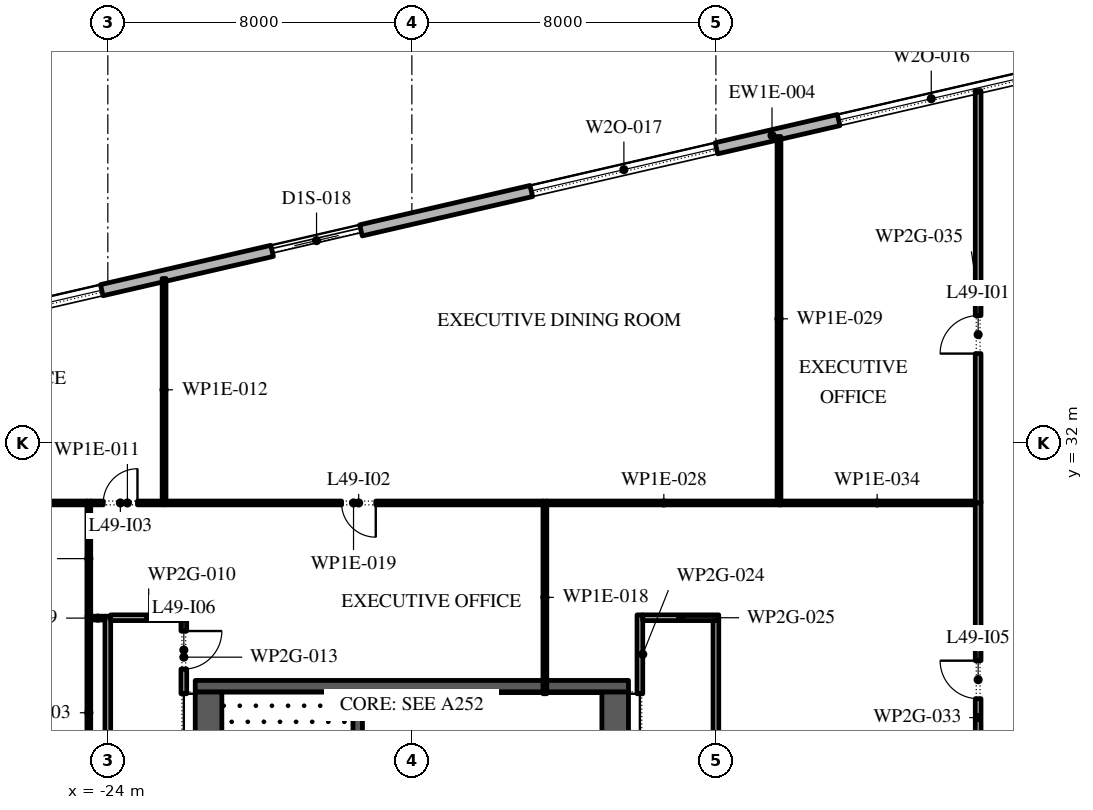
"""IFC4 building model, lengths in metres.
Left out: names, types, materials, properties, quantities, classifications, styles, units other than length and angle.
Written with IfcOpenShell. Run it as: python <this file> out.ifc"""

import sys

from ifc_helpers import new_model, si_unit, direction, frame, frame_2d, origin, place, context, subcontext, project, spatial, rectangle, extrude, element, fill, save


model = new_model("IFC4")
c1 = context("Model", 3, precision=1e-05, world=origin(), true_north=direction((0.0, 1.0)))
c2 = subcontext(c1, "Body", "Model", "MODEL_VIEW")
j1 = project(units=[si_unit("LENGTHUNIT", "METRE"), si_unit("PLANEANGLEUNIT", "RADIAN")], contexts=[c1])
p1 = place(None, origin())
s1 = spatial("IfcSite", under=j1, at=p1, CompositionType="ELEMENT")
p2 = place(p1, origin())
s2 = spatial("IfcBuilding", under=s1, at=p2, CompositionType="ELEMENT")
p3 = place(p2, frame((0.0, 0.0, 222.0)))
s3 = spatial("IfcBuildingStorey", under=s2, at=p3, CompositionType="ELEMENT", Elevation=222.0)
p4 = place(p3, frame((17.592, 45.657, 0.0), z_axis=(0.0, 0.0, 1.0), x_axis=(-0.974370243697, -0.224950279389, 0.0)))
e1 = element("IfcWall", 1, at=p4, inside=s3, PredefinedType="STANDARD", context=c2, shape_type="SweptSolid", body=[
    extrude(rectangle(XDim=49.5, YDim=0.3, at=frame_2d((24.75, 0.0))), origin(), (0.0, 0.0, 1.0), 3.75),
])
p5 = place(p4, frame((3.6, 0.0, 0.0)))
e2 = element("IfcOpeningElement", 2, at=p5, cuts=e1, PredefinedType="OPENING", context=c2, shape_type="SweptSolid", body=[
    extrude(rectangle(XDim=2.4, YDim=3.5, at=frame_2d((1.2, 1.75))), frame((0.0, 0.16, 0.0), z_axis=(0.0, -1.0, 0.0), x_axis=(1.0, 0.0, 0.0)), (0.0, 0.0, 1.0), 0.32),
])
p6 = place(p4, frame((9.65, 0.0, 0.45)))
e3 = element("IfcOpeningElement", 3, at=p6, cuts=e1, PredefinedType="OPENING", context=c2, shape_type="SweptSolid", body=[
    extrude(rectangle(XDim=5.0, YDim=2.2, at=frame_2d((2.5, 1.1))), frame((0.0, 0.16, 0.0), z_axis=(0.0, -1.0, 0.0), x_axis=(1.0, 0.0, 0.0)), (0.0, 0.0, 1.0), 0.32),
])
p7 = place(p4, frame((17.95, 0.0, 0.45)))
e4 = element("IfcOpeningElement", 4, at=p7, cuts=e1, PredefinedType="OPENING", context=c2, shape_type="SweptSolid", body=[
    extrude(rectangle(XDim=5.0, YDim=2.2, at=frame_2d((2.5, 1.1))), frame((0.0, 0.16, 0.0), z_axis=(0.0, -1.0, 0.0), x_axis=(1.0, 0.0, 0.0)), (0.0, 0.0, 1.0), 0.32),
])
p8 = place(p4, frame((26.25, 0.0, 0.45)))
e5 = element("IfcOpeningElement", 5, at=p8, cuts=e1, PredefinedType="OPENING", context=c2, shape_type="SweptSolid", body=[
    extrude(rectangle(XDim=5.0, YDim=2.2, at=frame_2d((2.5, 1.1))), frame((0.0, 0.16, 0.0), z_axis=(0.0, -1.0, 0.0), x_axis=(1.0, 0.0, 0.0)), (0.0, 0.0, 1.0), 0.32),
])
p9 = place(p4, frame((35.85, 0.0, 0.0)))
e6 = element("IfcOpeningElement", 6, at=p9, cuts=e1, PredefinedType="OPENING", context=c2, shape_type="SweptSolid", body=[
    extrude(rectangle(XDim=2.4, YDim=2.7, at=frame_2d((1.2, 1.35))), frame((0.0, 0.16, 0.0), z_axis=(0.0, -1.0, 0.0), x_axis=(1.0, 0.0, 0.0)), (0.0, 0.0, 1.0), 0.32),
])
p10 = place(p4, frame((42.85, 0.0, 0.45)))
e7 = element("IfcOpeningElement", 7, at=p10, cuts=e1, PredefinedType="OPENING", context=c2, shape_type="SweptSolid", body=[
    extrude(rectangle(XDim=5.0, YDim=2.275, at=frame_2d((2.5, 1.137))), frame((0.0, 0.16, 0.0), z_axis=(0.0, -1.0, 0.0), x_axis=(1.0, 0.0, 0.0)), (0.0, 0.0, 1.0), 0.32),
])
p11 = place(p3, frame((-33.157, 30.092, 0.0), z_axis=(0.0, 0.0, 1.0), x_axis=(0.224950279389, -0.974370243697, 0.0)))
e8 = element("IfcWall", 8, at=p11, inside=s3, PredefinedType="STANDARD", context=c2, shape_type="SweptSolid", body=[
    extrude(rectangle(XDim=49.5, YDim=0.3, at=frame_2d((24.75, 0.0))), origin(), (0.0, 0.0, 1.0), 3.75),
])
p12 = place(p11, frame((2.207, 0.0, 0.0)))
e9 = element("IfcOpeningElement", 9, at=p12, cuts=e8, PredefinedType="OPENING", context=c2, shape_type="SweptSolid", body=[
    extrude(rectangle(XDim=2.4, YDim=3.5, at=frame_2d((1.2, 1.75))), frame((0.0, 0.16, 0.0), z_axis=(0.0, -1.0, 0.0), x_axis=(1.0, 0.0, 0.0)), (0.0, 0.0, 1.0), 0.32),
])
p13 = place(p11, frame((7.871, 0.0, 0.45)))
e10 = element("IfcOpeningElement", 10, at=p13, cuts=e8, PredefinedType="OPENING", context=c2, shape_type="SweptSolid", body=[
    extrude(rectangle(XDim=5.0, YDim=2.575, at=frame_2d((2.5, 1.288))), frame((0.0, 0.16, 0.0), z_axis=(0.0, -1.0, 0.0), x_axis=(1.0, 0.0, 0.0)), (0.0, 0.0, 1.0), 0.32),
])
p14 = place(p11, frame((14.986, 0.0, 0.45)))
e11 = element("IfcOpeningElement", 11, at=p14, cuts=e8, PredefinedType="OPENING", context=c2, shape_type="SweptSolid", body=[
    extrude(rectangle(XDim=5.0, YDim=3.25, at=frame_2d((2.5, 1.625))), frame((0.0, 0.16, 0.0), z_axis=(0.0, -1.0, 0.0), x_axis=(1.0, 0.0, 0.0)), (0.0, 0.0, 1.0), 0.32),
])
p15 = place(p11, frame((22.1, 0.0, 0.45)))
e12 = element("IfcOpeningElement", 12, at=p15, cuts=e8, PredefinedType="OPENING", context=c2, shape_type="SweptSolid", body=[
    extrude(rectangle(XDim=5.0, YDim=2.75, at=frame_2d((2.5, 1.375))), frame((0.0, 0.16, 0.0), z_axis=(0.0, -1.0, 0.0), x_axis=(1.0, 0.0, 0.0)), (0.0, 0.0, 1.0), 0.32),
])
p16 = place(p11, frame((30.514, 0.0, 0.0)))
e13 = element("IfcOpeningElement", 13, at=p16, cuts=e8, PredefinedType="OPENING", context=c2, shape_type="SweptSolid", body=[
    extrude(rectangle(XDim=2.4, YDim=3.5, at=frame_2d((1.2, 1.75))), frame((0.0, 0.16, 0.0), z_axis=(0.0, -1.0, 0.0), x_axis=(1.0, 0.0, 0.0)), (0.0, 0.0, 1.0), 0.32),
])
p17 = place(p11, frame((36.329, 0.0, 0.45)))
e14 = element("IfcOpeningElement", 14, at=p17, cuts=e8, PredefinedType="OPENING", context=c2, shape_type="SweptSolid", body=[
    extrude(rectangle(XDim=5.0, YDim=3.25, at=frame_2d((2.5, 1.625))), frame((0.0, 0.16, 0.0), z_axis=(0.0, -1.0, 0.0), x_axis=(1.0, 0.0, 0.0)), (0.0, 0.0, 1.0), 0.32),
])
p18 = place(p11, frame((43.443, 0.0, 0.45)))
e15 = element("IfcOpeningElement", 15, at=p18, cuts=e8, PredefinedType="OPENING", context=c2, shape_type="SweptSolid", body=[
    extrude(rectangle(XDim=5.0, YDim=3.25, at=frame_2d((2.5, 1.625))), frame((0.0, 0.16, 0.0), z_axis=(0.0, -1.0, 0.0), x_axis=(1.0, 0.0, 0.0)), (0.0, 0.0, 1.0), 0.32),
])
p19 = place(p3, frame((-21.35, -2.45, 0.0), z_axis=(0.0, 0.0, 1.0), x_axis=(0.0, 1.0, 0.0)))
e16 = element("IfcWall", 16, at=p19, inside=s3, PredefinedType="SHEAR", context=c2, shape_type="SweptSolid", body=[
    extrude(rectangle(XDim=27.9, YDim=0.7, at=frame_2d((13.95, 0.0))), origin(), (0.0, 0.0, 1.0), 3.75),
])
p20 = place(p19, frame((5.05, 0.0, 0.0)))
e17 = element("IfcOpeningElement", 17, at=p20, cuts=e16, PredefinedType="OPENING", context=c2, shape_type="SweptSolid", body=[
    extrude(rectangle(XDim=1.2, YDim=2.1, at=frame_2d((0.6, 1.05))), frame((0.0, 0.36, 0.0), z_axis=(0.0, -1.0, 0.0), x_axis=(1.0, 0.0, 0.0)), (0.0, 0.0, 1.0), 0.72),
])
p21 = place(p19, frame((21.65, 0.0, 0.0)))
e18 = element("IfcOpeningElement", 18, at=p21, cuts=e16, PredefinedType="OPENING", context=c2, shape_type="SweptSolid", body=[
    extrude(rectangle(XDim=1.2, YDim=2.1, at=frame_2d((0.6, 1.05))), frame((0.0, 0.36, 0.0), z_axis=(0.0, -1.0, 0.0), x_axis=(1.0, 0.0, 0.0)), (0.0, 0.0, 1.0), 0.72),
])
p22 = place(p3, frame((-10.65, -2.45, 0.0), z_axis=(0.0, 0.0, 1.0), x_axis=(0.0, 1.0, 0.0)))
e19 = element("IfcWall", 19, at=p22, inside=s3, PredefinedType="SHEAR", context=c2, shape_type="SweptSolid", body=[
    extrude(rectangle(XDim=27.9, YDim=0.7, at=frame_2d((13.95, 0.0))), origin(), (0.0, 0.0, 1.0), 3.75),
])
p23 = place(p22, frame((23.65, 0.0, 0.0)))
e20 = element("IfcOpeningElement", 20, at=p23, cuts=e19, PredefinedType="OPENING", context=c2, shape_type="SweptSolid", body=[
    extrude(rectangle(XDim=2.4, YDim=2.1, at=frame_2d((1.2, 1.05))), frame((0.0, 0.36, 0.0), z_axis=(0.0, -1.0, 0.0), x_axis=(1.0, 0.0, 0.0)), (0.0, 0.0, 1.0), 0.72),
])
p24 = place(p22, frame((1.387, 0.0, 0.0)))
e21 = element("IfcOpeningElement", 21, at=p24, cuts=e19, PredefinedType="OPENING", context=c2, shape_type="SweptSolid", body=[
    extrude(rectangle(XDim=0.9, YDim=2.1, at=frame_2d((0.45, 1.05))), frame((0.0, 0.36, 0.0), z_axis=(0.0, -1.0, 0.0), x_axis=(1.0, 0.0, 0.0)), (0.0, 0.0, 1.0), 0.72),
])
p25 = place(p22, frame((4.562, 0.0, 0.0)))
e22 = element("IfcOpeningElement", 22, at=p25, cuts=e19, PredefinedType="OPENING", context=c2, shape_type="SweptSolid", body=[
    extrude(rectangle(XDim=1.0, YDim=2.1, at=frame_2d((0.5, 1.05))), frame((0.0, 0.36, 0.0), z_axis=(0.0, -1.0, 0.0), x_axis=(1.0, 0.0, 0.0)), (0.0, 0.0, 1.0), 0.72),
])
p26 = place(p3, frame((-21.7, 25.6, 0.0), z_axis=(0.0, 0.0, 1.0), x_axis=(1.0, 0.0, 0.0)))
e23 = element("IfcWall", 23, at=p26, inside=s3, PredefinedType="SHEAR", context=c2, shape_type="SweptSolid", body=[
    extrude(rectangle(XDim=11.4, YDim=0.3, at=frame_2d((5.7, 0.0))), origin(), (0.0, 0.0, 1.0), 3.75),
])
p27 = place(p3, frame((-17.425, 19.15, 0.0), z_axis=(0.0, 0.0, 1.0), x_axis=(0.0, 1.0, 0.0)))
e24 = element("IfcWall", 24, at=p27, inside=s3, PredefinedType="SHEAR", context=c2, shape_type="SweptSolid", body=[
    extrude(rectangle(XDim=6.3, YDim=0.25, at=frame_2d((3.15, 0.0))), origin(), (0.0, 0.0, 1.0), 3.75),
])
p28 = place(p27, frame((0.05, 0.0, 0.0)))
e25 = element("IfcOpeningElement", 25, at=p28, cuts=e24, PredefinedType="OPENING", context=c2, shape_type="SweptSolid", body=[
    extrude(rectangle(XDim=1.2, YDim=2.1, at=frame_2d((0.6, 1.05))), frame((0.0, 0.135, 0.0), z_axis=(0.0, -1.0, 0.0), x_axis=(1.0, 0.0, 0.0)), (0.0, 0.0, 1.0), 0.27),
])
p29 = place(p3, frame((-24.5, 22.36, 0.0), z_axis=(0.0, 0.0, 1.0), x_axis=(0.0, 1.0, 0.0)))
e26 = element("IfcWall", 26, at=p29, inside=s3, PredefinedType="PARTITIONING", context=c2, shape_type="SweptSolid", body=[
    extrude(rectangle(XDim=5.08, YDim=0.1, at=frame_2d((2.54, 0.0))), origin(), (0.0, 0.0, 1.0), 3.75),
])
p30 = place(p3, frame((-24.5, 27.44, 0.0), z_axis=(0.0, 0.0, 1.0), x_axis=(0.0, 1.0, 0.0)))
e27 = element("IfcWall", 27, at=p30, inside=s3, PredefinedType="PARTITIONING", context=c2, shape_type="SweptSolid", body=[
    extrude(rectangle(XDim=3.03, YDim=0.1, at=frame_2d((1.515, 0.0))), origin(), (0.0, 0.0, 1.0), 3.75),
])
p31 = place(p3, frame((-24.55, 30.42, 0.0), z_axis=(0.0, 0.0, 1.0), x_axis=(-1.0, 0.0, 0.0)))
e28 = element("IfcWall", 28, at=p31, inside=s3, PredefinedType="PARTITIONING", context=c2, shape_type="SweptSolid", body=[
    extrude(rectangle(XDim=7.432, YDim=0.1, at=frame_2d((3.716, 0.0))), origin(), (0.0, 0.0, 1.0), 3.75),
])
p32 = place(p3, frame((-24.0, 9.67, 0.0), z_axis=(0.0, 0.0, 1.0), x_axis=(0.0, 1.0, 0.0)))
e29 = element("IfcWall", 29, at=p32, inside=s3, PredefinedType="PARTITIONING", context=c2, shape_type="SweptSolid", body=[
    extrude(rectangle(XDim=17.77, YDim=0.15, at=frame_2d((8.885, 0.0))), origin(), (0.0, 0.0, 1.0), 3.75),
])
p33 = place(p32, frame((6.57, 0.0, 0.0)))
e30 = element("IfcOpeningElement", 30, at=p33, cuts=e29, PredefinedType="OPENING", context=c2, shape_type="SweptSolid", body=[
    extrude(rectangle(XDim=1.0, YDim=2.1, at=frame_2d((0.5, 1.05))), frame((0.0, 0.085, 0.0), z_axis=(0.0, -1.0, 0.0), x_axis=(1.0, 0.0, 0.0)), (0.0, 0.0, 1.0), 0.17),
])
p34 = place(p3, frame((-24.075, 27.39, 0.0), z_axis=(0.0, 0.0, 1.0), x_axis=(-1.0, 0.0, 0.0)))
e31 = element("IfcWall", 31, at=p34, inside=s3, PredefinedType="PARTITIONING", context=c2, shape_type="SweptSolid", body=[
    extrude(rectangle(XDim=0.375, YDim=0.1, at=frame_2d((0.188, 0.0))), origin(), (0.0, 0.0, 1.0), 3.75),
])
p35 = place(p3, frame((-23.925, 27.4, 0.0), z_axis=(0.0, 0.0, 1.0), x_axis=(1.0, 0.0, 0.0)))
e32 = element("IfcWall", 32, at=p35, inside=s3, PredefinedType="PARTITIONING", context=c2, shape_type="SweptSolid", body=[
    extrude(rectangle(XDim=2.0, YDim=0.15, at=frame_2d((1.0, 0.0))), origin(), (0.0, 0.0, 1.0), 3.75),
])
p36 = place(p3, frame((-22.52, 30.42, 0.0), z_axis=(0.0, 0.0, 1.0), x_axis=(-1.0, 0.0, 0.0)))
e33 = element("IfcWall", 33, at=p36, inside=s3, PredefinedType="PARTITIONING", context=c2, shape_type="SweptSolid", body=[
    extrude(rectangle(XDim=1.93, YDim=0.1, at=frame_2d((0.965, 0.0))), origin(), (0.0, 0.0, 1.0), 3.75),
])
p37 = place(p36, frame((0.7, 0.0, 0.0)))
e34 = element("IfcOpeningElement", 34, at=p37, cuts=e33, PredefinedType="OPENING", context=c2, shape_type="SweptSolid", body=[
    extrude(rectangle(XDim=0.9, YDim=2.1, at=frame_2d((0.45, 1.05))), frame((0.0, 0.06, 0.0), z_axis=(0.0, -1.0, 0.0), x_axis=(1.0, 0.0, 0.0)), (0.0, 0.0, 1.0), 0.12),
])
p38 = place(p3, frame((-22.52, 30.47, 0.0), z_axis=(0.0, 0.0, 1.0), x_axis=(0.0, 1.0, 0.0)))
e35 = element("IfcWall", 35, at=p38, inside=s3, PredefinedType="PARTITIONING", context=c2, shape_type="SweptSolid", body=[
    extrude(rectangle(XDim=5.855, YDim=0.1, at=frame_2d((2.927, 0.0))), origin(), (0.0, 0.0, 1.0), 3.75),
])
p39 = place(p3, frame((-22.0, 27.325, 0.0), z_axis=(0.0, 0.0, 1.0), x_axis=(0.0, -1.0, 0.0)))
e36 = element("IfcWall", 36, at=p39, inside=s3, PredefinedType="PARTITIONING", context=c2, shape_type="SweptSolid", body=[
    extrude(rectangle(XDim=1.925, YDim=0.15, at=frame_2d((0.962, 0.0))), origin(), (0.0, 0.0, 1.0), 3.75),
])
p40 = place(p39, frame((0.275, 0.0, 0.0)))
e37 = element("IfcOpeningElement", 37, at=p40, cuts=e36, PredefinedType="OPENING", context=c2, shape_type="SweptSolid", body=[
    extrude(rectangle(XDim=1.0, YDim=2.1, at=frame_2d((0.5, 1.05))), frame((0.0, 0.085, 0.0), z_axis=(0.0, -1.0, 0.0), x_axis=(1.0, 0.0, 0.0)), (0.0, 0.0, 1.0), 0.17),
])
p41 = place(p3, frame((-12.5, 25.4, 0.0), z_axis=(0.0, 0.0, 1.0), x_axis=(0.0, 1.0, 0.0)))
e38 = element("IfcWall", 38, at=p41, inside=s3, PredefinedType="PARTITIONING", context=c2, shape_type="SweptSolid", body=[
    extrude(rectangle(XDim=5.07, YDim=0.1, at=frame_2d((2.535, 0.0))), origin(), (0.0, 0.0, 1.0), 3.75),
])
p42 = place(p3, frame((-12.55, 30.42, 0.0), z_axis=(0.0, 0.0, 1.0), x_axis=(-1.0, 0.0, 0.0)))
e39 = element("IfcWall", 39, at=p42, inside=s3, PredefinedType="PARTITIONING", context=c2, shape_type="SweptSolid", body=[
    extrude(rectangle(XDim=9.97, YDim=0.1, at=frame_2d((4.985, 0.0))), origin(), (0.0, 0.0, 1.0), 3.75),
])
p43 = place(p42, frame((4.4, 0.0, 0.0)))
e40 = element("IfcOpeningElement", 40, at=p43, cuts=e39, PredefinedType="OPENING", context=c2, shape_type="SweptSolid", body=[
    extrude(rectangle(XDim=0.9, YDim=2.1, at=frame_2d((0.45, 1.05))), frame((0.0, 0.06, 0.0), z_axis=(0.0, -1.0, 0.0), x_axis=(1.0, 0.0, 0.0)), (0.0, 0.0, 1.0), 0.12),
])
p44 = place(p3, frame((-10.0, 25.4, 0.0), z_axis=(0.0, 0.0, 1.0), x_axis=(0.0, 1.0, 0.0)))
e41 = element("IfcWall", 41, at=p44, inside=s3, PredefinedType="PARTITIONING", context=c2, shape_type="SweptSolid", body=[
    extrude(rectangle(XDim=2.075, YDim=0.15, at=frame_2d((1.038, 0.0))), origin(), (0.0, 0.0, 1.0), 3.75),
])
p45 = place(p3, frame((-9.925, 27.4, 0.0), z_axis=(0.0, 0.0, 1.0), x_axis=(1.0, 0.0, 0.0)))
e42 = element("IfcWall", 42, at=p45, inside=s3, PredefinedType="PARTITIONING", context=c2, shape_type="SweptSolid", body=[
    extrude(rectangle(XDim=2.0, YDim=0.15, at=frame_2d((1.0, 0.0))), origin(), (0.0, 0.0, 1.0), 3.75),
])
p46 = place(p3, frame((-8.0, 27.325, 0.0), z_axis=(0.0, 0.0, 1.0), x_axis=(0.0, -1.0, 0.0)))
e43 = element("IfcWall", 43, at=p46, inside=s3, PredefinedType="PARTITIONING", context=c2, shape_type="SweptSolid", body=[
    extrude(rectangle(XDim=8.25, YDim=0.15, at=frame_2d((4.125, 0.0))), origin(), (0.0, 0.0, 1.0), 3.75),
])
p47 = place(p3, frame((-6.29, 30.42, 0.0), z_axis=(0.0, 0.0, 1.0), x_axis=(-1.0, 0.0, 0.0)))
e44 = element("IfcWall", 44, at=p47, inside=s3, PredefinedType="PARTITIONING", context=c2, shape_type="SweptSolid", body=[
    extrude(rectangle(XDim=6.16, YDim=0.1, at=frame_2d((3.08, 0.0))), origin(), (0.0, 0.0, 1.0), 3.75),
])
p48 = place(p3, frame((-6.34, 30.47, 0.0), z_axis=(0.0, 0.0, 1.0), x_axis=(0.0, 1.0, 0.0)))
e45 = element("IfcWall", 45, at=p48, inside=s3, PredefinedType="PARTITIONING", context=c2, shape_type="SweptSolid", body=[
    extrude(rectangle(XDim=9.591, YDim=0.1, at=frame_2d((4.795, 0.0))), origin(), (0.0, 0.0, 1.0), 3.75),
])
p49 = place(p3, frame((-1.1, 19.075, 0.0), z_axis=(0.0, 0.0, 1.0), x_axis=(0.0, 1.0, 0.0)))
e46 = element("IfcWall", 46, at=p49, inside=s3, PredefinedType="PARTITIONING", context=c2, shape_type="SweptSolid", body=[
    extrude(rectangle(XDim=11.395, YDim=0.15, at=frame_2d((5.698, 0.0))), origin(), (0.0, 0.0, 1.0), 3.75),
])
p50 = place(p49, frame((6.195, 0.0, 0.0)))
e47 = element("IfcOpeningElement", 47, at=p50, cuts=e46, PredefinedType="OPENING", context=c2, shape_type="SweptSolid", body=[
    extrude(rectangle(XDim=1.0, YDim=2.1, at=frame_2d((0.5, 1.05))), frame((0.0, 0.085, 0.0), z_axis=(0.0, -1.0, 0.0), x_axis=(1.0, 0.0, 0.0)), (0.0, 0.0, 1.0), 0.17),
])
p51 = place(p3, frame((-1.175, 30.42, 0.0), z_axis=(0.0, 0.0, 1.0), x_axis=(-1.0, 0.0, 0.0)))
e48 = element("IfcWall", 48, at=p51, inside=s3, PredefinedType="PARTITIONING", context=c2, shape_type="SweptSolid", body=[
    extrude(rectangle(XDim=5.165, YDim=0.1, at=frame_2d((2.583, 0.0))), origin(), (0.0, 0.0, 1.0), 3.75),
])
p52 = place(p3, frame((-1.1, 30.42, 0.0), z_axis=(0.0, 0.0, 1.0), x_axis=(0.0, 1.0, 0.0)))
e49 = element("IfcWall", 49, at=p52, inside=s3, PredefinedType="PARTITIONING", context=c2, shape_type="SweptSolid", body=[
    extrude(rectangle(XDim=10.85, YDim=0.15, at=frame_2d((5.425, 0.0))), origin(), (0.0, 0.0, 1.0), 3.75),
])
p53 = place(p52, frame((3.93, 0.0, 0.0)))
e50 = element("IfcOpeningElement", 50, at=p53, cuts=e49, PredefinedType="OPENING", context=c2, shape_type="SweptSolid", body=[
    extrude(rectangle(XDim=1.0, YDim=2.1, at=frame_2d((0.5, 1.05))), frame((0.0, 0.085, 0.0), z_axis=(0.0, -1.0, 0.0), x_axis=(1.0, 0.0, 0.0)), (0.0, 0.0, 1.0), 0.17),
])
p54 = place(p7, origin())
e51 = element("IfcWindow", 51, at=p54, inside=s3, PartitioningType="DOUBLE_PANEL_VERTICAL", PredefinedType="WINDOW", context=c2, shape_type="SweptSolid", body=[
    extrude(rectangle(XDim=5.0, YDim=2.2, at=frame_2d((2.5, 1.1))), frame((0.0, 0.03, 0.0), z_axis=(0.0, -1.0, 0.0), x_axis=(1.0, 0.0, 0.0)), (0.0, 0.0, 1.0), 0.06),
])
fill(e4, e51)
p55 = place(p8, origin())
e52 = element("IfcWindow", 52, at=p55, inside=s3, PartitioningType="DOUBLE_PANEL_VERTICAL", PredefinedType="WINDOW", context=c2, shape_type="SweptSolid", body=[
    extrude(rectangle(XDim=5.0, YDim=2.2, at=frame_2d((2.5, 1.1))), frame((0.0, 0.03, 0.0), z_axis=(0.0, -1.0, 0.0), x_axis=(1.0, 0.0, 0.0)), (0.0, 0.0, 1.0), 0.06),
])
fill(e5, e52)
p56 = place(p9, origin())
e53 = element("IfcDoor", 53, at=p56, inside=s3, OperationType="DOUBLE_DOOR_SLIDING", PredefinedType="DOOR", context=c2, shape_type="SweptSolid", body=[
    extrude(rectangle(XDim=2.4, YDim=2.7, at=frame_2d((1.2, 1.35))), frame((0.0, 0.025, 0.0), z_axis=(0.0, -1.0, 0.0), x_axis=(1.0, 0.0, 0.0)), (0.0, 0.0, 1.0), 0.05),
])
fill(e6, e53)
p57 = place(p10, origin())
e54 = element("IfcWindow", 54, at=p57, inside=s3, PartitioningType="DOUBLE_PANEL_VERTICAL", PredefinedType="WINDOW", context=c2, shape_type="SweptSolid", body=[
    extrude(rectangle(XDim=5.0, YDim=2.275, at=frame_2d((2.5, 1.137))), frame((0.0, 0.03, 0.0), z_axis=(0.0, -1.0, 0.0), x_axis=(1.0, 0.0, 0.0)), (0.0, 0.0, 1.0), 0.06),
])
fill(e7, e54)
p58 = place(p53, origin())
e55 = element("IfcDoor", 55, at=p58, inside=s3, OperationType="SINGLE_SWING_RIGHT", PredefinedType="DOOR", context=c2, shape_type="SweptSolid", body=[
    extrude(rectangle(XDim=1.0, YDim=2.1, at=frame_2d((0.5, 1.05))), frame((0.0, 0.025, 0.0), z_axis=(0.0, -1.0, 0.0), x_axis=(1.0, 0.0, 0.0)), (0.0, 0.0, 1.0), 0.05),
])
fill(e50, e55)
p59 = place(p43, origin())
e56 = element("IfcDoor", 56, at=p59, inside=s3, OperationType="SINGLE_SWING_RIGHT", PredefinedType="DOOR", context=c2, shape_type="SweptSolid", body=[
    extrude(rectangle(XDim=0.9, YDim=2.1, at=frame_2d((0.45, 1.05))), frame((0.0, 0.025, 0.0), z_axis=(0.0, -1.0, 0.0), x_axis=(1.0, 0.0, 0.0)), (0.0, 0.0, 1.0), 0.05),
])
fill(e40, e56)
p60 = place(p37, frame((0.9, 0.0, 0.0), z_axis=(0.0, 0.0, 1.0), x_axis=(-1.0, 0.0, 0.0)))
e57 = element("IfcDoor", 57, at=p60, inside=s3, OperationType="SINGLE_SWING_LEFT", PredefinedType="DOOR", context=c2, shape_type="SweptSolid", body=[
    extrude(rectangle(XDim=0.9, YDim=2.1, at=frame_2d((0.45, 1.05))), frame((0.0, 0.025, 0.0), z_axis=(0.0, -1.0, 0.0), x_axis=(1.0, 0.0, 0.0)), (0.0, 0.0, 1.0), 0.05),
])
fill(e34, e57)
p61 = place(p50, origin())
e58 = element("IfcDoor", 58, at=p61, inside=s3, OperationType="SINGLE_SWING_LEFT", PredefinedType="DOOR", context=c2, shape_type="SweptSolid", body=[
    extrude(rectangle(XDim=1.0, YDim=2.1, at=frame_2d((0.5, 1.05))), frame((0.0, 0.025, 0.0), z_axis=(0.0, -1.0, 0.0), x_axis=(1.0, 0.0, 0.0)), (0.0, 0.0, 1.0), 0.05),
])
fill(e47, e58)
p62 = place(p40, origin())
e59 = element("IfcDoor", 59, at=p62, inside=s3, OperationType="SINGLE_SWING_RIGHT", PredefinedType="DOOR", context=c2, shape_type="SweptSolid", body=[
    extrude(rectangle(XDim=1.0, YDim=2.1, at=frame_2d((0.5, 1.05))), frame((0.0, 0.025, 0.0), z_axis=(0.0, -1.0, 0.0), x_axis=(1.0, 0.0, 0.0)), (0.0, 0.0, 1.0), 0.05),
])
fill(e37, e59)
save(model, sys.argv[1])
